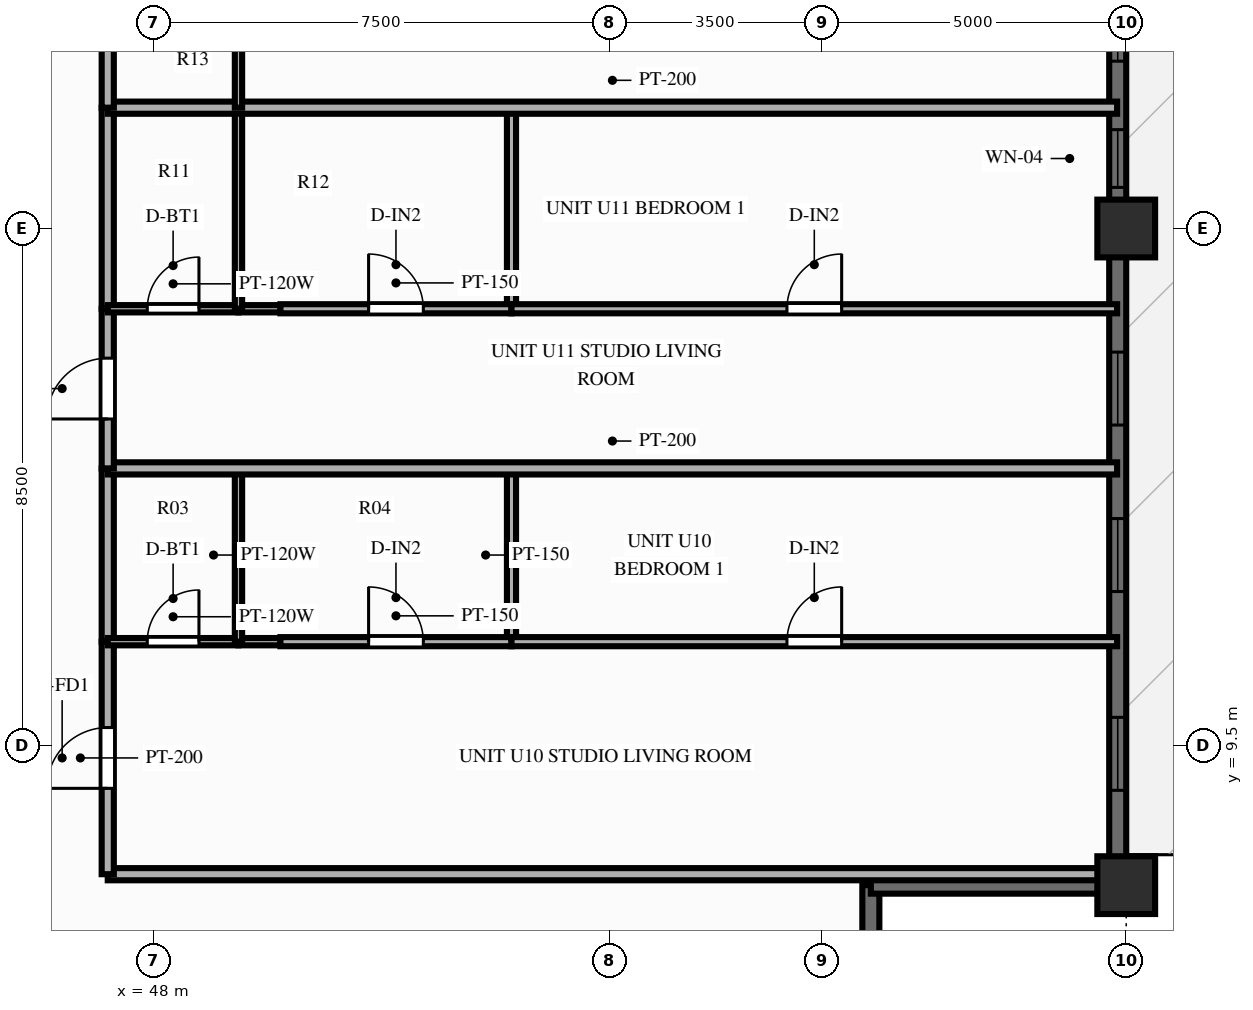
"""IFC4 building model, lengths in metres.
Left out: names, types, materials, properties, quantities, classifications, styles, units other than length and angle.
Written with IfcOpenShell. Run it as: python <this file> out.ifc"""

import sys

from ifc_helpers import new_model, si_unit, direction, frame, frame_2d, origin, origin_2d, place, context, subcontext, project, spatial, rectangle, extrude, source, transform, mapped, element, fill, save


model = new_model("IFC4")
c1 = context("Model", 3, precision=1e-05, world=origin(), true_north=direction((0.0, 1.0)))
c2 = subcontext(c1, "Body", "Model", "MODEL_VIEW")
j1 = project(units=[si_unit("LENGTHUNIT", "METRE"), si_unit("PLANEANGLEUNIT", "RADIAN")], contexts=[c1])
p1 = place(None, origin())
s1 = spatial("IfcSite", under=j1, at=p1, CompositionType="ELEMENT")
p2 = place(p1, origin())
s2 = spatial("IfcBuilding", under=s1, at=p2, CompositionType="ELEMENT")
p3 = place(p2, frame((0.0, 0.0, 119.85)))
s3 = spatial("IfcBuildingStorey", under=s2, at=p3, CompositionType="ELEMENT", Elevation=119.85)
m1 = source(origin(), c2, "Body", "SweptSolid", [
    extrude(rectangle(XDim=0.95, YDim=0.95, at=origin_2d()), origin(), (0.0, 0.0, 1.0), 3.0),
])
for number, where, z_axis, x_axis in (
    (1, (64.0, 7.2, 0.0), (0.0, 0.0, 1.0), (1.0, 0.0, 0.0)),
    (2, (64.0, 18.0, 0.0), (0.0, 0.0, 1.0), (1.0, 0.0, 0.0)),
):
    element("IfcColumn", number, at=place(p3, frame(where, z_axis=z_axis, x_axis=x_axis)), inside=s3, PredefinedType="COLUMN", context=c2, shape_type="MappedRepresentation", body=[
        mapped(m1, transform((0.0, 0.0, 0.0), scale=1.0)),
    ])
p4 = place(p3, frame((63.86, 7.2, 0.0), z_axis=(0.0, 0.0, 1.0), x_axis=(0.0, 1.0, 0.0)))
e3 = element("IfcWall", 3, at=p4, inside=s3, PredefinedType="SOLIDWALL", context=c2, shape_type="SweptSolid", body=[
    extrude(rectangle(XDim=39.6, YDim=0.28, at=frame_2d((19.8, 0.0))), origin(), (0.0, 0.0, 1.0), 2.28),
])
p5 = place(p4, frame((1.56, 0.0, 0.25)))
e4 = element("IfcOpeningElement", 4, at=p5, cuts=e3, PredefinedType="OPENING", context=c2, shape_type="SweptSolid", body=[
    extrude(rectangle(XDim=1.2, YDim=1.5, at=frame_2d((0.6, 0.75))), frame((0.0, 0.152, 0.0), z_axis=(0.0, -1.0, 0.0), x_axis=(1.0, 0.0, 0.0)), (0.0, 0.0, 1.0), 0.304),
])
p6 = place(p4, frame((4.829, 0.0, 0.25)))
e5 = element("IfcOpeningElement", 5, at=p6, cuts=e3, PredefinedType="OPENING", context=c2, shape_type="SweptSolid", body=[
    extrude(rectangle(XDim=1.2, YDim=1.5, at=frame_2d((0.6, 0.75))), frame((0.0, 0.152, 0.0), z_axis=(0.0, -1.0, 0.0), x_axis=(1.0, 0.0, 0.0)), (0.0, 0.0, 1.0), 0.304),
])
p7 = place(p4, frame((7.567, 0.0, 0.25)))
e6 = element("IfcOpeningElement", 6, at=p7, cuts=e3, PredefinedType="OPENING", context=c2, shape_type="SweptSolid", body=[
    extrude(rectangle(XDim=1.2, YDim=1.5, at=frame_2d((0.6, 0.75))), frame((0.0, 0.152, 0.0), z_axis=(0.0, -1.0, 0.0), x_axis=(1.0, 0.0, 0.0)), (0.0, 0.0, 1.0), 0.304),
])
p8 = place(p4, frame((11.476, 0.0, 0.25)))
e7 = element("IfcOpeningElement", 7, at=p8, cuts=e3, PredefinedType="OPENING", context=c2, shape_type="SweptSolid", body=[
    extrude(rectangle(XDim=0.95, YDim=1.5, at=frame_2d((0.475, 0.75))), frame((0.0, 0.152, 0.0), z_axis=(0.0, -1.0, 0.0), x_axis=(1.0, 0.0, 0.0)), (0.0, 0.0, 1.0), 0.304),
])
p9 = place(p4, frame((13.552, 0.0, 0.25)))
e8 = element("IfcOpeningElement", 8, at=p9, cuts=e3, PredefinedType="OPENING", context=c2, shape_type="SweptSolid", body=[
    extrude(rectangle(XDim=1.2, YDim=1.5, at=frame_2d((0.6, 0.75))), frame((0.0, 0.152, 0.0), z_axis=(0.0, -1.0, 0.0), x_axis=(1.0, 0.0, 0.0)), (0.0, 0.0, 1.0), 0.304),
])
p10 = place(p4, frame((16.518, 0.0, 0.25)))
e9 = element("IfcOpeningElement", 9, at=p10, cuts=e3, PredefinedType="OPENING", context=c2, shape_type="SweptSolid", body=[
    extrude(rectangle(XDim=1.2, YDim=1.5, at=frame_2d((0.6, 0.75))), frame((0.0, 0.152, 0.0), z_axis=(0.0, -1.0, 0.0), x_axis=(1.0, 0.0, 0.0)), (0.0, 0.0, 1.0), 0.304),
])
p11 = place(p4, frame((19.2, 0.0, 0.25)))
e10 = element("IfcOpeningElement", 10, at=p11, cuts=e3, PredefinedType="OPENING", context=c2, shape_type="SweptSolid", body=[
    extrude(rectangle(XDim=1.2, YDim=1.5, at=frame_2d((0.6, 0.75))), frame((0.0, 0.152, 0.0), z_axis=(0.0, -1.0, 0.0), x_axis=(1.0, 0.0, 0.0)), (0.0, 0.0, 1.0), 0.304),
])
p12 = place(p4, frame((21.578, 0.0, 0.25)))
e11 = element("IfcOpeningElement", 11, at=p12, cuts=e3, PredefinedType="OPENING", context=c2, shape_type="SweptSolid", body=[
    extrude(rectangle(XDim=1.2, YDim=1.5, at=frame_2d((0.6, 0.75))), frame((0.0, 0.152, 0.0), z_axis=(0.0, -1.0, 0.0), x_axis=(1.0, 0.0, 0.0)), (0.0, 0.0, 1.0), 0.304),
])
p13 = place(p4, frame((26.313, 0.0, 0.0), z_axis=(0.0, 0.0, 1.0), x_axis=(-1.0, 0.0, 0.0)))
e12 = element("IfcOpeningElement", 12, at=p13, cuts=e3, PredefinedType="OPENING", context=c2, shape_type="SweptSolid", body=[
    extrude(rectangle(XDim=1.6, YDim=2.15, at=frame_2d((0.8, 1.075))), frame((0.0, 0.152, 0.0), z_axis=(0.0, -1.0, 0.0), x_axis=(1.0, 0.0, 0.0)), (0.0, 0.0, 1.0), 0.304),
])
p14 = place(p4, frame((29.305, 0.0, 0.25)))
e13 = element("IfcOpeningElement", 13, at=p14, cuts=e3, PredefinedType="OPENING", context=c2, shape_type="SweptSolid", body=[
    extrude(rectangle(XDim=0.7, YDim=1.5, at=frame_2d((0.35, 0.75))), frame((0.0, 0.152, 0.0), z_axis=(0.0, -1.0, 0.0), x_axis=(1.0, 0.0, 0.0)), (0.0, 0.0, 1.0), 0.304),
])
p15 = place(p4, frame((30.848, 0.0, 0.25)))
e14 = element("IfcOpeningElement", 14, at=p15, cuts=e3, PredefinedType="OPENING", context=c2, shape_type="SweptSolid", body=[
    extrude(rectangle(XDim=1.2, YDim=1.5, at=frame_2d((0.6, 0.75))), frame((0.0, 0.152, 0.0), z_axis=(0.0, -1.0, 0.0), x_axis=(1.0, 0.0, 0.0)), (0.0, 0.0, 1.0), 0.304),
])
p16 = place(p4, frame((34.183, 0.0, 0.25)))
e15 = element("IfcOpeningElement", 15, at=p16, cuts=e3, PredefinedType="OPENING", context=c2, shape_type="SweptSolid", body=[
    extrude(rectangle(XDim=1.2, YDim=1.5, at=frame_2d((0.6, 0.75))), frame((0.0, 0.152, 0.0), z_axis=(0.0, -1.0, 0.0), x_axis=(1.0, 0.0, 0.0)), (0.0, 0.0, 1.0), 0.304),
])
p17 = place(p4, frame((37.452, 0.0, 0.25)))
e16 = element("IfcOpeningElement", 16, at=p17, cuts=e3, PredefinedType="OPENING", context=c2, shape_type="SweptSolid", body=[
    extrude(rectangle(XDim=1.2, YDim=1.5, at=frame_2d((0.6, 0.75))), frame((0.0, 0.152, 0.0), z_axis=(0.0, -1.0, 0.0), x_axis=(1.0, 0.0, 0.0)), (0.0, 0.0, 1.0), 0.304),
])
for number, where, z_axis, x_axis in (
    (17, (59.8, 3.08, 0.0), (0.0, 0.0, 1.0), (0.0, 1.0, 0.0)),
    (18, (59.8, 7.2, 0.0), (0.0, 0.0, 1.0), (1.0, 0.0, 0.0)),
):
    element("IfcWall", number, at=place(p3, frame(where, z_axis=z_axis, x_axis=x_axis)), inside=s3, PredefinedType="SOLIDWALL", context=c2, shape_type="SweptSolid", body=[
        extrude(rectangle(XDim=4.12, YDim=0.28, at=frame_2d((2.06, 0.0))), origin(), (0.0, 0.0, 1.0), 2.28),
    ])
p18 = place(p3, frame((47.25, 7.38, 0.0), z_axis=(0.0, 0.0, 1.0), x_axis=(1.0, 0.0, 0.0)))
e19 = element("IfcWall", 19, at=p18, inside=s3, PredefinedType="PARTITIONING", context=c2, shape_type="SweptSolid", body=[
    extrude(rectangle(XDim=16.6, YDim=0.2, at=frame_2d((8.3, 0.0))), origin(), (0.0, 0.0, 1.0), 2.79),
])
p19 = place(p3, frame((47.25, 7.38, 0.0), z_axis=(0.0, 0.0, 1.0), x_axis=(0.0, 1.0, 0.0)))
e20 = element("IfcWall", 20, at=p19, inside=s3, PredefinedType="PARTITIONING", context=c2, shape_type="SweptSolid", body=[
    extrude(rectangle(XDim=3.824, YDim=0.2, at=frame_2d((1.912, 0.0))), origin(), (0.0, 0.0, 1.0), 2.79),
])
p20 = place(p19, frame((1.412, 0.0, 0.0)))
e21 = element("IfcOpeningElement", 21, at=p20, cuts=e20, PredefinedType="OPENING", context=c2, shape_type="SweptSolid", body=[
    extrude(rectangle(XDim=1.0, YDim=2.15, at=frame_2d((0.5, 1.075))), frame((0.0, 0.112, 0.0), z_axis=(0.0, -1.0, 0.0), x_axis=(1.0, 0.0, 0.0)), (0.0, 0.0, 1.0), 0.224),
])
p21 = place(p3, frame((47.25, 11.204, 0.0), z_axis=(0.0, 0.0, 1.0), x_axis=(0.0, 1.0, 0.0)))
e22 = element("IfcWall", 22, at=p21, inside=s3, PredefinedType="PARTITIONING", context=c2, shape_type="SweptSolid", body=[
    extrude(rectangle(XDim=2.85, YDim=0.2, at=frame_2d((1.425, 0.0))), origin(), (0.0, 0.0, 1.0), 2.79),
])
p22 = place(p3, frame((47.25, 11.204, 0.0), z_axis=(0.0, 0.0, 1.0), x_axis=(1.0, 0.0, 0.0)))
e23 = element("IfcWall", 23, at=p22, inside=s3, PredefinedType="PARTITIONING", context=c2, shape_type="SweptSolid", body=[
    extrude(rectangle(XDim=2.15, YDim=0.12, at=frame_2d((1.075, 0.0))), origin(), (0.0, 0.0, 1.0), 2.79),
])
p23 = place(p22, frame((0.65, 0.0, 0.0)))
e24 = element("IfcOpeningElement", 24, at=p23, cuts=e23, PredefinedType="OPENING", context=c2, shape_type="SweptSolid", body=[
    extrude(rectangle(XDim=0.85, YDim=2.05, at=frame_2d((0.425, 1.025))), frame((0.0, 0.072, 0.0), z_axis=(0.0, -1.0, 0.0), x_axis=(1.0, 0.0, 0.0)), (0.0, 0.0, 1.0), 0.144),
])
p24 = place(p3, frame((49.4, 11.204, 0.0), z_axis=(0.0, 0.0, 1.0), x_axis=(1.0, 0.0, 0.0)))
e25 = element("IfcWall", 25, at=p24, inside=s3, PredefinedType="PARTITIONING", context=c2, shape_type="SweptSolid", body=[
    extrude(rectangle(XDim=0.69, YDim=0.12, at=frame_2d((0.345, 0.0))), origin(), (0.0, 0.0, 1.0), 2.79),
])
p25 = place(p3, frame((49.4, 11.204, 0.0), z_axis=(0.0, 0.0, 1.0), x_axis=(0.0, 1.0, 0.0)))
e26 = element("IfcWall", 26, at=p25, inside=s3, PredefinedType="PARTITIONING", context=c2, shape_type="SweptSolid", body=[
    extrude(rectangle(XDim=2.85, YDim=0.12, at=frame_2d((1.425, 0.0))), origin(), (0.0, 0.0, 1.0), 2.79),
])
p26 = place(p3, frame((53.89, 11.204, 0.0), z_axis=(0.0, 0.0, 1.0), x_axis=(0.0, 1.0, 0.0)))
e27 = element("IfcWall", 27, at=p26, inside=s3, PredefinedType="PARTITIONING", context=c2, shape_type="SweptSolid", body=[
    extrude(rectangle(XDim=2.85, YDim=0.15, at=frame_2d((1.425, 0.0))), origin(), (0.0, 0.0, 1.0), 2.79),
])
p27 = place(p3, frame((50.09, 11.204, 0.0), z_axis=(0.0, 0.0, 1.0), x_axis=(1.0, 0.0, 0.0)))
e28 = element("IfcWall", 28, at=p27, inside=s3, PredefinedType="PARTITIONING", context=c2, shape_type="SweptSolid", body=[
    extrude(rectangle(XDim=3.8, YDim=0.15, at=frame_2d((1.9, 0.0))), origin(), (0.0, 0.0, 1.0), 2.79),
])
p28 = place(p27, frame((1.45, 0.0, 0.0)))
e29 = element("IfcOpeningElement", 29, at=p28, cuts=e28, PredefinedType="OPENING", context=c2, shape_type="SweptSolid", body=[
    extrude(rectangle(XDim=0.9, YDim=2.1, at=frame_2d((0.45, 1.05))), frame((0.0, 0.087, 0.0), z_axis=(0.0, -1.0, 0.0), x_axis=(1.0, 0.0, 0.0)), (0.0, 0.0, 1.0), 0.174),
])
p29 = place(p3, frame((53.89, 11.204, 0.0), z_axis=(0.0, 0.0, 1.0), x_axis=(1.0, 0.0, 0.0)))
e30 = element("IfcWall", 30, at=p29, inside=s3, PredefinedType="PARTITIONING", context=c2, shape_type="SweptSolid", body=[
    extrude(rectangle(XDim=9.96, YDim=0.15, at=frame_2d((4.98, 0.0))), origin(), (0.0, 0.0, 1.0), 2.79),
])
p30 = place(p29, frame((4.53, 0.0, 0.0)))
e31 = element("IfcOpeningElement", 31, at=p30, cuts=e30, PredefinedType="OPENING", context=c2, shape_type="SweptSolid", body=[
    extrude(rectangle(XDim=0.9, YDim=2.1, at=frame_2d((0.45, 1.05))), frame((0.0, 0.087, 0.0), z_axis=(0.0, -1.0, 0.0), x_axis=(1.0, 0.0, 0.0)), (0.0, 0.0, 1.0), 0.174),
])
p31 = place(p3, frame((47.25, 14.054, 0.0), z_axis=(0.0, 0.0, 1.0), x_axis=(1.0, 0.0, 0.0)))
e32 = element("IfcWall", 32, at=p31, inside=s3, PredefinedType="PARTITIONING", context=c2, shape_type="SweptSolid", body=[
    extrude(rectangle(XDim=16.6, YDim=0.2, at=frame_2d((8.3, 0.0))), origin(), (0.0, 0.0, 1.0), 2.79),
])
p32 = place(p3, frame((47.25, 14.054, 0.0), z_axis=(0.0, 0.0, 1.0), x_axis=(0.0, 1.0, 0.0)))
e33 = element("IfcWall", 33, at=p32, inside=s3, PredefinedType="PARTITIONING", context=c2, shape_type="SweptSolid", body=[
    extrude(rectangle(XDim=2.625, YDim=0.2, at=frame_2d((1.313, 0.0))), origin(), (0.0, 0.0, 1.0), 2.79),
])
p33 = place(p32, frame((0.813, 0.0, 0.0)))
e34 = element("IfcOpeningElement", 34, at=p33, cuts=e33, PredefinedType="OPENING", context=c2, shape_type="SweptSolid", body=[
    extrude(rectangle(XDim=1.0, YDim=2.15, at=frame_2d((0.5, 1.075))), frame((0.0, 0.112, 0.0), z_axis=(0.0, -1.0, 0.0), x_axis=(1.0, 0.0, 0.0)), (0.0, 0.0, 1.0), 0.224),
])
p34 = place(p3, frame((47.25, 16.68, 0.0), z_axis=(0.0, 0.0, 1.0), x_axis=(0.0, 1.0, 0.0)))
e35 = element("IfcWall", 35, at=p34, inside=s3, PredefinedType="PARTITIONING", context=c2, shape_type="SweptSolid", body=[
    extrude(rectangle(XDim=3.307, YDim=0.2, at=frame_2d((1.654, 0.0))), origin(), (0.0, 0.0, 1.0), 2.79),
])
p35 = place(p3, frame((47.25, 16.68, 0.0), z_axis=(0.0, 0.0, 1.0), x_axis=(1.0, 0.0, 0.0)))
e36 = element("IfcWall", 36, at=p35, inside=s3, PredefinedType="PARTITIONING", context=c2, shape_type="SweptSolid", body=[
    extrude(rectangle(XDim=2.15, YDim=0.12, at=frame_2d((1.075, 0.0))), origin(), (0.0, 0.0, 1.0), 2.79),
])
p36 = place(p35, frame((0.65, 0.0, 0.0)))
e37 = element("IfcOpeningElement", 37, at=p36, cuts=e36, PredefinedType="OPENING", context=c2, shape_type="SweptSolid", body=[
    extrude(rectangle(XDim=0.85, YDim=2.05, at=frame_2d((0.425, 1.025))), frame((0.0, 0.072, 0.0), z_axis=(0.0, -1.0, 0.0), x_axis=(1.0, 0.0, 0.0)), (0.0, 0.0, 1.0), 0.144),
])
p37 = place(p3, frame((49.4, 16.68, 0.0), z_axis=(0.0, 0.0, 1.0), x_axis=(1.0, 0.0, 0.0)))
e38 = element("IfcWall", 38, at=p37, inside=s3, PredefinedType="PARTITIONING", context=c2, shape_type="SweptSolid", body=[
    extrude(rectangle(XDim=0.69, YDim=0.12, at=frame_2d((0.345, 0.0))), origin(), (0.0, 0.0, 1.0), 2.79),
])
p38 = place(p3, frame((49.4, 16.68, 0.0), z_axis=(0.0, 0.0, 1.0), x_axis=(0.0, 1.0, 0.0)))
e39 = element("IfcWall", 39, at=p38, inside=s3, PredefinedType="PARTITIONING", context=c2, shape_type="SweptSolid", body=[
    extrude(rectangle(XDim=3.307, YDim=0.12, at=frame_2d((1.654, 0.0))), origin(), (0.0, 0.0, 1.0), 2.79),
])
p39 = place(p3, frame((53.89, 16.68, 0.0), z_axis=(0.0, 0.0, 1.0), x_axis=(0.0, 1.0, 0.0)))
e40 = element("IfcWall", 40, at=p39, inside=s3, PredefinedType="PARTITIONING", context=c2, shape_type="SweptSolid", body=[
    extrude(rectangle(XDim=3.307, YDim=0.15, at=frame_2d((1.654, 0.0))), origin(), (0.0, 0.0, 1.0), 2.79),
])
p40 = place(p3, frame((50.09, 16.68, 0.0), z_axis=(0.0, 0.0, 1.0), x_axis=(1.0, 0.0, 0.0)))
e41 = element("IfcWall", 41, at=p40, inside=s3, PredefinedType="PARTITIONING", context=c2, shape_type="SweptSolid", body=[
    extrude(rectangle(XDim=3.8, YDim=0.15, at=frame_2d((1.9, 0.0))), origin(), (0.0, 0.0, 1.0), 2.79),
])
p41 = place(p40, frame((1.45, 0.0, 0.0)))
e42 = element("IfcOpeningElement", 42, at=p41, cuts=e41, PredefinedType="OPENING", context=c2, shape_type="SweptSolid", body=[
    extrude(rectangle(XDim=0.9, YDim=2.1, at=frame_2d((0.45, 1.05))), frame((0.0, 0.087, 0.0), z_axis=(0.0, -1.0, 0.0), x_axis=(1.0, 0.0, 0.0)), (0.0, 0.0, 1.0), 0.174),
])
p42 = place(p3, frame((53.89, 16.68, 0.0), z_axis=(0.0, 0.0, 1.0), x_axis=(1.0, 0.0, 0.0)))
e43 = element("IfcWall", 43, at=p42, inside=s3, PredefinedType="PARTITIONING", context=c2, shape_type="SweptSolid", body=[
    extrude(rectangle(XDim=9.96, YDim=0.15, at=frame_2d((4.98, 0.0))), origin(), (0.0, 0.0, 1.0), 2.79),
])
p43 = place(p42, frame((4.53, 0.0, 0.0)))
e44 = element("IfcOpeningElement", 44, at=p43, cuts=e43, PredefinedType="OPENING", context=c2, shape_type="SweptSolid", body=[
    extrude(rectangle(XDim=0.9, YDim=2.1, at=frame_2d((0.45, 1.05))), frame((0.0, 0.087, 0.0), z_axis=(0.0, -1.0, 0.0), x_axis=(1.0, 0.0, 0.0)), (0.0, 0.0, 1.0), 0.174),
])
p44 = place(p3, frame((47.25, 19.987, 0.0), z_axis=(0.0, 0.0, 1.0), x_axis=(1.0, 0.0, 0.0)))
e45 = element("IfcWall", 45, at=p44, inside=s3, PredefinedType="PARTITIONING", context=c2, shape_type="SweptSolid", body=[
    extrude(rectangle(XDim=16.6, YDim=0.2, at=frame_2d((8.3, 0.0))), origin(), (0.0, 0.0, 1.0), 2.79),
])
p45 = place(p3, frame((47.25, 19.987, 0.0), z_axis=(0.0, 0.0, 1.0), x_axis=(0.0, 1.0, 0.0)))
e46 = element("IfcWall", 46, at=p45, inside=s3, PredefinedType="PARTITIONING", context=c2, shape_type="SweptSolid", body=[
    extrude(rectangle(XDim=2.729, YDim=0.2, at=frame_2d((1.365, 0.0))), origin(), (0.0, 0.0, 1.0), 2.79),
])
p46 = place(p3, frame((49.4, 19.987, 0.0), z_axis=(0.0, 0.0, 1.0), x_axis=(0.0, 1.0, 0.0)))
e47 = element("IfcWall", 47, at=p46, inside=s3, PredefinedType="PARTITIONING", context=c2, shape_type="SweptSolid", body=[
    extrude(rectangle(XDim=2.729, YDim=0.12, at=frame_2d((1.365, 0.0))), origin(), (0.0, 0.0, 1.0), 2.79),
])
m2 = source(origin(), c2, "Body", "SweptSolid", [
    extrude(rectangle(XDim=1.2, YDim=1.5, at=frame_2d((0.6, 0.75))), frame((0.0, 0.03, 0.0), z_axis=(0.0, -1.0, 0.0), x_axis=(1.0, 0.0, 0.0)), (0.0, 0.0, 1.0), 0.06),
])
p47 = place(p5, origin())
e48 = element("IfcWindow", 48, at=p47, inside=s3, PartitioningType="SINGLE_PANEL", PredefinedType="WINDOW", context=c2, shape_type="MappedRepresentation", body=[
    mapped(m2, transform((0.0, 0.0, 0.0), scale=1.0)),
])
fill(e4, e48)
p48 = place(p6, origin())
e49 = element("IfcWindow", 49, at=p48, inside=s3, PartitioningType="SINGLE_PANEL", PredefinedType="WINDOW", context=c2, shape_type="MappedRepresentation", body=[
    mapped(m2, transform((0.0, 0.0, 0.0), scale=1.0)),
])
fill(e5, e49)
p49 = place(p7, origin())
e50 = element("IfcWindow", 50, at=p49, inside=s3, PartitioningType="SINGLE_PANEL", PredefinedType="WINDOW", context=c2, shape_type="MappedRepresentation", body=[
    mapped(m2, transform((0.0, 0.0, 0.0), scale=1.0)),
])
fill(e6, e50)
m3 = source(origin(), c2, "Body", "SweptSolid", [
    extrude(rectangle(XDim=0.95, YDim=1.5, at=frame_2d((0.475, 0.75))), frame((0.0, 0.03, 0.0), z_axis=(0.0, -1.0, 0.0), x_axis=(1.0, 0.0, 0.0)), (0.0, 0.0, 1.0), 0.06),
])
p50 = place(p8, origin())
e51 = element("IfcWindow", 51, at=p50, inside=s3, PartitioningType="SINGLE_PANEL", PredefinedType="WINDOW", context=c2, shape_type="MappedRepresentation", body=[
    mapped(m3, transform((0.0, 0.0, 0.0), scale=1.0)),
])
fill(e7, e51)
p51 = place(p9, origin())
e52 = element("IfcWindow", 52, at=p51, inside=s3, PartitioningType="SINGLE_PANEL", PredefinedType="WINDOW", context=c2, shape_type="MappedRepresentation", body=[
    mapped(m2, transform((0.0, 0.0, 0.0), scale=1.0)),
])
fill(e8, e52)
m4 = source(origin(), c2, "Body", "SweptSolid", [
    extrude(rectangle(XDim=1.0, YDim=2.15, at=frame_2d((0.5, 1.075))), frame((0.0, 0.025, 0.0), z_axis=(0.0, -1.0, 0.0), x_axis=(1.0, 0.0, 0.0)), (0.0, 0.0, 1.0), 0.05),
])
p52 = place(p20, origin())
e53 = element("IfcDoor", 53, at=p52, inside=s3, OperationType="SINGLE_SWING_LEFT", PredefinedType="DOOR", context=c2, shape_type="MappedRepresentation", body=[
    mapped(m4, transform((0.0, 0.0, 0.0), scale=1.0)),
])
fill(e21, e53)
m5 = source(origin(), c2, "Body", "SweptSolid", [
    extrude(rectangle(XDim=0.85, YDim=2.05, at=frame_2d((0.425, 1.025))), frame((0.0, 0.025, 0.0), z_axis=(0.0, -1.0, 0.0), x_axis=(1.0, 0.0, 0.0)), (0.0, 0.0, 1.0), 0.05),
])
p53 = place(p23, origin())
e54 = element("IfcDoor", 54, at=p53, inside=s3, OperationType="SINGLE_SWING_RIGHT", PredefinedType="DOOR", context=c2, shape_type="MappedRepresentation", body=[
    mapped(m5, transform((0.0, 0.0, 0.0), scale=1.0)),
])
fill(e24, e54)
m6 = source(origin(), c2, "Body", "SweptSolid", [
    extrude(rectangle(XDim=0.9, YDim=2.1, at=frame_2d((0.45, 1.05))), frame((0.0, 0.025, 0.0), z_axis=(0.0, -1.0, 0.0), x_axis=(1.0, 0.0, 0.0)), (0.0, 0.0, 1.0), 0.05),
])
p54 = place(p28, origin())
e55 = element("IfcDoor", 55, at=p54, inside=s3, OperationType="SINGLE_SWING_LEFT", PredefinedType="DOOR", context=c2, shape_type="MappedRepresentation", body=[
    mapped(m6, transform((0.0, 0.0, 0.0), scale=1.0)),
])
fill(e29, e55)
p55 = place(p30, origin())
e56 = element("IfcDoor", 56, at=p55, inside=s3, OperationType="SINGLE_SWING_RIGHT", PredefinedType="DOOR", context=c2, shape_type="MappedRepresentation", body=[
    mapped(m6, transform((0.0, 0.0, 0.0), scale=1.0)),
])
fill(e31, e56)
p56 = place(p33, origin())
e57 = element("IfcDoor", 57, at=p56, inside=s3, OperationType="SINGLE_SWING_LEFT", PredefinedType="DOOR", context=c2, shape_type="MappedRepresentation", body=[
    mapped(m4, transform((0.0, 0.0, 0.0), scale=1.0)),
])
fill(e34, e57)
p57 = place(p36, origin())
e58 = element("IfcDoor", 58, at=p57, inside=s3, OperationType="SINGLE_SWING_RIGHT", PredefinedType="DOOR", context=c2, shape_type="MappedRepresentation", body=[
    mapped(m5, transform((0.0, 0.0, 0.0), scale=1.0)),
])
fill(e37, e58)
p58 = place(p41, origin())
e59 = element("IfcDoor", 59, at=p58, inside=s3, OperationType="SINGLE_SWING_LEFT", PredefinedType="DOOR", context=c2, shape_type="MappedRepresentation", body=[
    mapped(m6, transform((0.0, 0.0, 0.0), scale=1.0)),
])
fill(e42, e59)
p59 = place(p43, origin())
e60 = element("IfcDoor", 60, at=p59, inside=s3, OperationType="SINGLE_SWING_RIGHT", PredefinedType="DOOR", context=c2, shape_type="MappedRepresentation", body=[
    mapped(m6, transform((0.0, 0.0, 0.0), scale=1.0)),
])
fill(e44, e60)
save(model, sys.argv[1])
